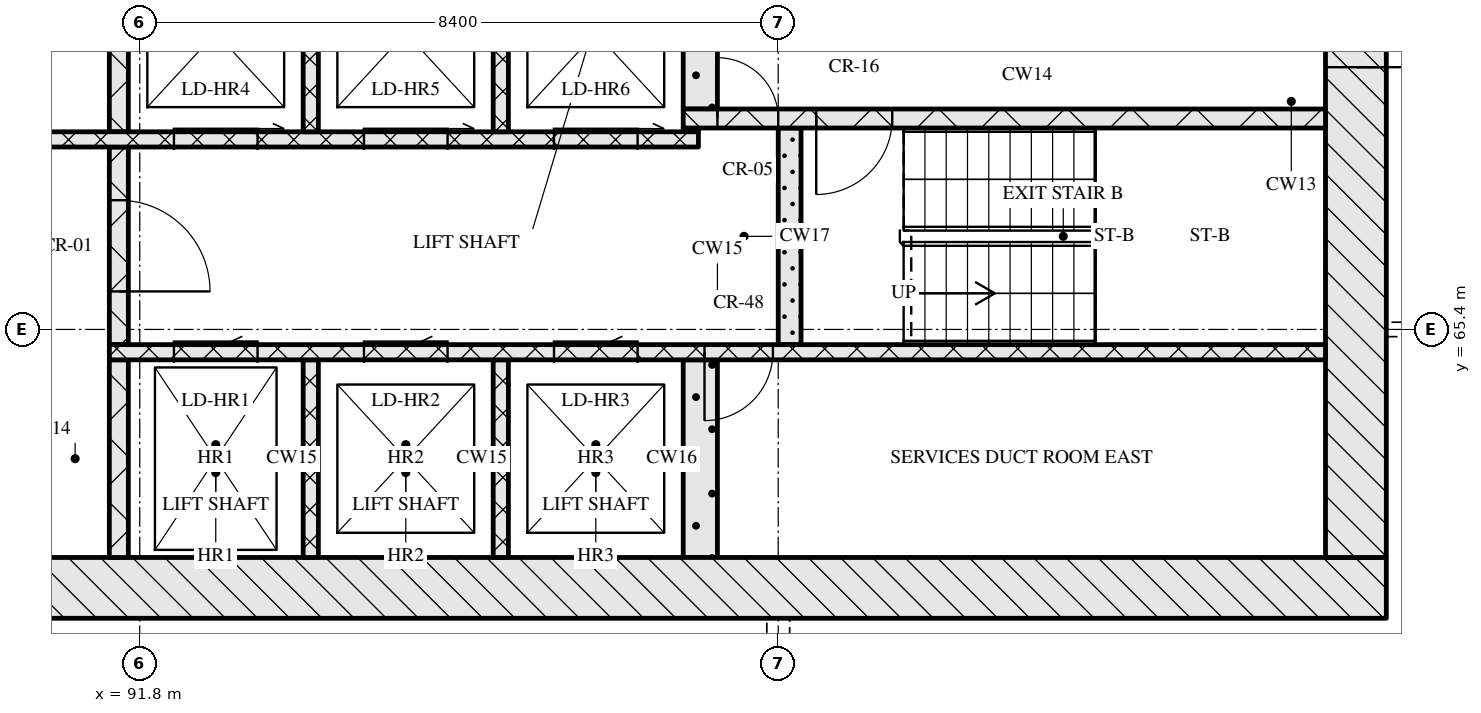
"""IFC4 building model, lengths in metres.
Left out: names, types, materials, properties, quantities, classifications, styles, units other than length and angle.
Written with IfcOpenShell. Run it as: python <this file> out.ifc"""

import sys

from ifc_helpers import new_model, si_unit, direction, frame, frame_2d, origin, place, context, subcontext, project, spatial, rectangle, extrude, element, fill, save


model = new_model("IFC4")
c1 = context("Model", 3, precision=1e-05, world=origin(), true_north=direction((0.0, 1.0)))
c2 = subcontext(c1, "Body", "Model", "MODEL_VIEW")
j1 = project(units=[si_unit("LENGTHUNIT", "METRE"), si_unit("PLANEANGLEUNIT", "RADIAN")], contexts=[c1])
p1 = place(None, origin())
s1 = spatial("IfcSite", under=j1, at=p1, CompositionType="ELEMENT")
p2 = place(p1, origin())
s2 = spatial("IfcBuilding", under=s1, at=p2, CompositionType="ELEMENT")
p3 = place(p2, frame((0.0, 0.0, 190.65)))
s3 = spatial("IfcBuildingStorey", under=s2, at=p3, CompositionType="ELEMENT", Elevation=190.65)
p4 = place(p3, frame((67.0, 62.0, 0.0), z_axis=(0.0, 0.0, 1.0), x_axis=(1.0, 0.0, 0.0)))
e1 = element("IfcWall", 1, at=p4, inside=s3, PredefinedType="SOLIDWALL", context=c2, shape_type="SweptSolid", body=[
    extrude(rectangle(XDim=41.2, YDim=0.8, at=frame_2d((20.6, 0.0))), origin(), (0.0, 0.0, 1.0), 3.3),
])
p5 = place(p4, frame((20.95, 0.0, 0.0)))
e2 = element("IfcOpeningElement", 2, at=p5, cuts=e1, PredefinedType="OPENING", context=c2, shape_type="SweptSolid", body=[
    extrude(rectangle(XDim=1.8, YDim=2.1, at=frame_2d((0.9, 1.05))), frame((0.0, 0.41, 0.0), z_axis=(0.0, -1.0, 0.0), x_axis=(1.0, 0.0, 0.0)), (0.0, 0.0, 1.0), 0.82),
])
p6 = place(p3, frame((107.8, 62.4, 0.0), z_axis=(0.0, 0.0, 1.0), x_axis=(0.0, 1.0, 0.0)))
e3 = element("IfcWall", 3, at=p6, inside=s3, PredefinedType="SOLIDWALL", context=c2, shape_type="SweptSolid", body=[
    extrude(rectangle(XDim=12.0, YDim=0.8, at=frame_2d((6.0, 0.0))), origin(), (0.0, 0.0, 1.0), 3.3),
])
p7 = place(p6, frame((6.45, 0.0, 0.0)))
e4 = element("IfcOpeningElement", 4, at=p7, cuts=e3, PredefinedType="OPENING", context=c2, shape_type="SweptSolid", body=[
    extrude(rectangle(XDim=1.2, YDim=2.1, at=frame_2d((0.6, 1.05))), frame((0.0, 0.41, 0.0), z_axis=(0.0, -1.0, 0.0), x_axis=(1.0, 0.0, 0.0)), (0.0, 0.0, 1.0), 0.82),
])
p8 = place(p3, frame((91.525, 62.4, 0.0), z_axis=(0.0, 0.0, 1.0), x_axis=(0.0, 1.0, 0.0)))
e5 = element("IfcWall", 5, at=p8, inside=s3, PredefinedType="SOLIDWALL", context=c2, shape_type="SweptSolid", body=[
    extrude(rectangle(XDim=2.6, YDim=0.25, at=frame_2d((1.3, 0.0))), origin(), (0.0, 0.0, 1.0), 3.3),
])
for number, where, z_axis, x_axis in (
    (6, (94.05, 62.4, 0.0), (0.0, 0.0, 1.0), (0.0, 1.0, 0.0)),
    (7, (96.55, 62.4, 0.0), (0.0, 0.0, 1.0), (0.0, 1.0, 0.0)),
):
    element("IfcWall", number, at=place(p3, frame(where, z_axis=z_axis, x_axis=x_axis)), inside=s3, PredefinedType="SOLIDWALL", context=c2, shape_type="SweptSolid", body=[
        extrude(rectangle(XDim=2.6, YDim=0.2, at=frame_2d((1.3, 0.0))), origin(), (0.0, 0.0, 1.0), 3.3),
    ])
p9 = place(p3, frame((99.175, 62.4, 0.0), z_axis=(0.0, 0.0, 1.0), x_axis=(0.0, 1.0, 0.0)))
e8 = element("IfcWall", 8, at=p9, inside=s3, PredefinedType="SOLIDWALL", context=c2, shape_type="SweptSolid", body=[
    extrude(rectangle(XDim=2.6, YDim=0.45, at=frame_2d((1.3, 0.0))), origin(), (0.0, 0.0, 1.0), 3.3),
])
p10 = place(p3, frame((91.4, 65.1, 0.0), z_axis=(0.0, 0.0, 1.0), x_axis=(1.0, 0.0, 0.0)))
e9 = element("IfcWall", 9, at=p10, inside=s3, PredefinedType="SOLIDWALL", context=c2, shape_type="SweptSolid", body=[
    extrude(rectangle(XDim=16.0, YDim=0.2, at=frame_2d((8.0, 0.0))), origin(), (0.0, 0.0, 1.0), 3.3),
])
p11 = place(p10, frame((0.85, 0.0, 0.0)))
e10 = element("IfcOpeningElement", 10, at=p11, cuts=e9, PredefinedType="OPENING", context=c2, shape_type="SweptSolid", body=[
    extrude(rectangle(XDim=1.1, YDim=2.1, at=frame_2d((0.55, 1.05))), frame((0.0, 0.11, 0.0), z_axis=(0.0, -1.0, 0.0), x_axis=(1.0, 0.0, 0.0)), (0.0, 0.0, 1.0), 0.22),
])
p12 = place(p10, frame((3.35, 0.0, 0.0)))
e11 = element("IfcOpeningElement", 11, at=p12, cuts=e9, PredefinedType="OPENING", context=c2, shape_type="SweptSolid", body=[
    extrude(rectangle(XDim=1.1, YDim=2.1, at=frame_2d((0.55, 1.05))), frame((0.0, 0.11, 0.0), z_axis=(0.0, -1.0, 0.0), x_axis=(1.0, 0.0, 0.0)), (0.0, 0.0, 1.0), 0.22),
])
p13 = place(p10, frame((5.85, 0.0, 0.0)))
e12 = element("IfcOpeningElement", 12, at=p13, cuts=e9, PredefinedType="OPENING", context=c2, shape_type="SweptSolid", body=[
    extrude(rectangle(XDim=1.1, YDim=2.1, at=frame_2d((0.55, 1.05))), frame((0.0, 0.11, 0.0), z_axis=(0.0, -1.0, 0.0), x_axis=(1.0, 0.0, 0.0)), (0.0, 0.0, 1.0), 0.22),
])
p14 = place(p10, frame((7.83, 0.0, 0.0)))
e13 = element("IfcOpeningElement", 13, at=p14, cuts=e9, PredefinedType="OPENING", context=c2, shape_type="SweptSolid", body=[
    extrude(rectangle(XDim=0.9, YDim=2.1, at=frame_2d((0.45, 1.05))), frame((0.0, 0.11, 0.0), z_axis=(0.0, -1.0, 0.0), x_axis=(1.0, 0.0, 0.0)), (0.0, 0.0, 1.0), 0.22),
])
p15 = place(p3, frame((91.525, 65.2, 0.0), z_axis=(0.0, 0.0, 1.0), x_axis=(0.0, 1.0, 0.0)))
e14 = element("IfcWall", 14, at=p15, inside=s3, PredefinedType="SOLIDWALL", context=c2, shape_type="SweptSolid", body=[
    extrude(rectangle(XDim=2.6, YDim=0.25, at=frame_2d((1.3, 0.0))), origin(), (0.0, 0.0, 1.0), 3.3),
])
p16 = place(p15, frame((0.7, 0.0, 0.0)))
e15 = element("IfcOpeningElement", 15, at=p16, cuts=e14, PredefinedType="OPENING", context=c2, shape_type="SweptSolid", body=[
    extrude(rectangle(XDim=1.2, YDim=2.1, at=frame_2d((0.6, 1.05))), frame((0.0, 0.135, 0.0), z_axis=(0.0, -1.0, 0.0), x_axis=(1.0, 0.0, 0.0)), (0.0, 0.0, 1.0), 0.27),
])
p17 = place(p3, frame((100.35, 65.2, 0.0), z_axis=(0.0, 0.0, 1.0), x_axis=(0.0, 1.0, 0.0)))
e16 = element("IfcWall", 16, at=p17, inside=s3, PredefinedType="SOLIDWALL", context=c2, shape_type="SweptSolid", body=[
    extrude(rectangle(XDim=2.85, YDim=0.3, at=frame_2d((1.425, 0.0))), origin(), (0.0, 0.0, 1.0), 3.3),
])
p18 = place(p3, frame((76.05, 67.9, 0.0), z_axis=(0.0, 0.0, 1.0), x_axis=(1.0, 0.0, 0.0)))
e17 = element("IfcWall", 17, at=p18, inside=s3, PredefinedType="SOLIDWALL", context=c2, shape_type="SweptSolid", body=[
    extrude(rectangle(XDim=23.1, YDim=0.2, at=frame_2d((11.55, 0.0))), origin(), (0.0, 0.0, 1.0), 3.3),
])
p19 = place(p18, frame((1.95, 0.0, 0.0)))
e18 = element("IfcOpeningElement", 18, at=p19, cuts=e17, PredefinedType="OPENING", context=c2, shape_type="SweptSolid", body=[
    extrude(rectangle(XDim=0.9, YDim=2.1, at=frame_2d((0.45, 1.05))), frame((0.0, 0.11, 0.0), z_axis=(0.0, -1.0, 0.0), x_axis=(1.0, 0.0, 0.0)), (0.0, 0.0, 1.0), 0.22),
])
p20 = place(p18, frame((5.66, 0.0, 0.0)))
e19 = element("IfcOpeningElement", 19, at=p20, cuts=e17, PredefinedType="OPENING", context=c2, shape_type="SweptSolid", body=[
    extrude(rectangle(XDim=0.9, YDim=2.1, at=frame_2d((0.45, 1.05))), frame((0.0, 0.11, 0.0), z_axis=(0.0, -1.0, 0.0), x_axis=(1.0, 0.0, 0.0)), (0.0, 0.0, 1.0), 0.22),
])
p21 = place(p18, frame((9.7, 0.0, 0.0)))
e20 = element("IfcOpeningElement", 20, at=p21, cuts=e17, PredefinedType="OPENING", context=c2, shape_type="SweptSolid", body=[
    extrude(rectangle(XDim=0.9, YDim=2.1, at=frame_2d((0.45, 1.05))), frame((0.0, 0.11, 0.0), z_axis=(0.0, -1.0, 0.0), x_axis=(1.0, 0.0, 0.0)), (0.0, 0.0, 1.0), 0.22),
])
p22 = place(p18, frame((13.55, 0.0, 0.0)))
e21 = element("IfcOpeningElement", 21, at=p22, cuts=e17, PredefinedType="OPENING", context=c2, shape_type="SweptSolid", body=[
    extrude(rectangle(XDim=1.0, YDim=2.1, at=frame_2d((0.5, 1.05))), frame((0.0, 0.11, 0.0), z_axis=(0.0, -1.0, 0.0), x_axis=(1.0, 0.0, 0.0)), (0.0, 0.0, 1.0), 0.22),
])
p23 = place(p18, frame((16.2, 0.0, 0.0)))
e22 = element("IfcOpeningElement", 22, at=p23, cuts=e17, PredefinedType="OPENING", context=c2, shape_type="SweptSolid", body=[
    extrude(rectangle(XDim=1.1, YDim=2.1, at=frame_2d((0.55, 1.05))), frame((0.0, 0.11, 0.0), z_axis=(0.0, -1.0, 0.0), x_axis=(1.0, 0.0, 0.0)), (0.0, 0.0, 1.0), 0.22),
])
p24 = place(p18, frame((18.7, 0.0, 0.0)))
e23 = element("IfcOpeningElement", 23, at=p24, cuts=e17, PredefinedType="OPENING", context=c2, shape_type="SweptSolid", body=[
    extrude(rectangle(XDim=1.1, YDim=2.1, at=frame_2d((0.55, 1.05))), frame((0.0, 0.11, 0.0), z_axis=(0.0, -1.0, 0.0), x_axis=(1.0, 0.0, 0.0)), (0.0, 0.0, 1.0), 0.22),
])
p25 = place(p18, frame((21.2, 0.0, 0.0)))
e24 = element("IfcOpeningElement", 24, at=p25, cuts=e17, PredefinedType="OPENING", context=c2, shape_type="SweptSolid", body=[
    extrude(rectangle(XDim=1.1, YDim=2.1, at=frame_2d((0.55, 1.05))), frame((0.0, 0.11, 0.0), z_axis=(0.0, -1.0, 0.0), x_axis=(1.0, 0.0, 0.0)), (0.0, 0.0, 1.0), 0.22),
])
p26 = place(p3, frame((91.525, 68.0, 0.0), z_axis=(0.0, 0.0, 1.0), x_axis=(0.0, 1.0, 0.0)))
e25 = element("IfcWall", 25, at=p26, inside=s3, PredefinedType="SOLIDWALL", context=c2, shape_type="SweptSolid", body=[
    extrude(rectangle(XDim=2.6, YDim=0.25, at=frame_2d((1.3, 0.0))), origin(), (0.0, 0.0, 1.0), 3.3),
])
for number, where, z_axis, x_axis in (
    (26, (94.05, 68.0, 0.0), (0.0, 0.0, 1.0), (0.0, 1.0, 0.0)),
    (27, (96.55, 68.0, 0.0), (0.0, 0.0, 1.0), (0.0, 1.0, 0.0)),
):
    element("IfcWall", number, at=place(p3, frame(where, z_axis=z_axis, x_axis=x_axis)), inside=s3, PredefinedType="SOLIDWALL", context=c2, shape_type="SweptSolid", body=[
        extrude(rectangle(XDim=2.6, YDim=0.2, at=frame_2d((1.3, 0.0))), origin(), (0.0, 0.0, 1.0), 3.3),
    ])
p27 = place(p3, frame((98.95, 68.025, 0.0), z_axis=(0.0, 0.0, 1.0), x_axis=(1.0, 0.0, 0.0)))
e28 = element("IfcWall", 28, at=p27, inside=s3, PredefinedType="SOLIDWALL", context=c2, shape_type="SweptSolid", body=[
    extrude(rectangle(XDim=0.2, YDim=0.05, at=frame_2d((0.1, 0.0))), origin(), (0.0, 0.0, 1.0), 3.3),
])
p28 = place(p3, frame((98.95, 68.175, 0.0), z_axis=(0.0, 0.0, 1.0), x_axis=(1.0, 0.0, 0.0)))
e29 = element("IfcWall", 29, at=p28, inside=s3, PredefinedType="SOLIDWALL", context=c2, shape_type="SweptSolid", body=[
    extrude(rectangle(XDim=8.45, YDim=0.25, at=frame_2d((4.225, 0.0))), origin(), (0.0, 0.0, 1.0), 3.3),
])
p29 = place(p28, frame((0.45, 0.0, 0.0)))
e30 = element("IfcOpeningElement", 30, at=p29, cuts=e29, PredefinedType="OPENING", context=c2, shape_type="SweptSolid", body=[
    extrude(rectangle(XDim=0.8, YDim=2.1, at=frame_2d((0.4, 1.05))), frame((0.0, 0.135, 0.0), z_axis=(0.0, -1.0, 0.0), x_axis=(1.0, 0.0, 0.0)), (0.0, 0.0, 1.0), 0.27),
])
p30 = place(p28, frame((1.75, 0.0, 0.0)))
e31 = element("IfcOpeningElement", 31, at=p30, cuts=e29, PredefinedType="OPENING", context=c2, shape_type="SweptSolid", body=[
    extrude(rectangle(XDim=1.0, YDim=2.1, at=frame_2d((0.5, 1.05))), frame((0.0, 0.135, 0.0), z_axis=(0.0, -1.0, 0.0), x_axis=(1.0, 0.0, 0.0)), (0.0, 0.0, 1.0), 0.27),
])
p31 = place(p3, frame((99.175, 68.3, 0.0), z_axis=(0.0, 0.0, 1.0), x_axis=(0.0, 1.0, 0.0)))
e32 = element("IfcWall", 32, at=p31, inside=s3, PredefinedType="SOLIDWALL", context=c2, shape_type="SweptSolid", body=[
    extrude(rectangle(XDim=2.3, YDim=0.45, at=frame_2d((1.15, 0.0))), origin(), (0.0, 0.0, 1.0), 3.3),
])
p32 = place(p11, origin())
e33 = element("IfcDoor", 33, at=p32, inside=s3, OperationType="SLIDING_TO_LEFT", PredefinedType="DOOR", context=c2, shape_type="SweptSolid", body=[
    extrude(rectangle(XDim=1.1, YDim=2.1, at=frame_2d((0.55, 1.05))), frame((0.0, 0.025, 0.0), z_axis=(0.0, -1.0, 0.0), x_axis=(1.0, 0.0, 0.0)), (0.0, 0.0, 1.0), 0.05),
])
fill(e10, e33)
p33 = place(p12, origin())
e34 = element("IfcDoor", 34, at=p33, inside=s3, OperationType="SLIDING_TO_LEFT", PredefinedType="DOOR", context=c2, shape_type="SweptSolid", body=[
    extrude(rectangle(XDim=1.1, YDim=2.1, at=frame_2d((0.55, 1.05))), frame((0.0, 0.025, 0.0), z_axis=(0.0, -1.0, 0.0), x_axis=(1.0, 0.0, 0.0)), (0.0, 0.0, 1.0), 0.05),
])
fill(e11, e34)
p34 = place(p13, origin())
e35 = element("IfcDoor", 35, at=p34, inside=s3, OperationType="SLIDING_TO_LEFT", PredefinedType="DOOR", context=c2, shape_type="SweptSolid", body=[
    extrude(rectangle(XDim=1.1, YDim=2.1, at=frame_2d((0.55, 1.05))), frame((0.0, 0.025, 0.0), z_axis=(0.0, -1.0, 0.0), x_axis=(1.0, 0.0, 0.0)), (0.0, 0.0, 1.0), 0.05),
])
fill(e12, e35)
p35 = place(p14, origin())
e36 = element("IfcDoor", 36, at=p35, inside=s3, OperationType="SINGLE_SWING_RIGHT", PredefinedType="DOOR", context=c2, shape_type="SweptSolid", body=[
    extrude(rectangle(XDim=0.9, YDim=2.1, at=frame_2d((0.45, 1.05))), frame((0.0, 0.025, 0.0), z_axis=(0.0, -1.0, 0.0), x_axis=(1.0, 0.0, 0.0)), (0.0, 0.0, 1.0), 0.05),
])
fill(e13, e36)
p36 = place(p16, origin())
e37 = element("IfcDoor", 37, at=p36, inside=s3, OperationType="SINGLE_SWING_RIGHT", PredefinedType="DOOR", context=c2, shape_type="SweptSolid", body=[
    extrude(rectangle(XDim=1.2, YDim=2.1, at=frame_2d((0.6, 1.05))), frame((0.0, 0.025, 0.0), z_axis=(0.0, -1.0, 0.0), x_axis=(1.0, 0.0, 0.0)), (0.0, 0.0, 1.0), 0.05),
])
fill(e15, e37)
p37 = place(p23, origin())
e38 = element("IfcDoor", 38, at=p37, inside=s3, OperationType="SLIDING_TO_RIGHT", PredefinedType="DOOR", context=c2, shape_type="SweptSolid", body=[
    extrude(rectangle(XDim=1.1, YDim=2.1, at=frame_2d((0.55, 1.05))), frame((0.0, 0.025, 0.0), z_axis=(0.0, -1.0, 0.0), x_axis=(1.0, 0.0, 0.0)), (0.0, 0.0, 1.0), 0.05),
])
fill(e22, e38)
p38 = place(p24, origin())
e39 = element("IfcDoor", 39, at=p38, inside=s3, OperationType="SLIDING_TO_RIGHT", PredefinedType="DOOR", context=c2, shape_type="SweptSolid", body=[
    extrude(rectangle(XDim=1.1, YDim=2.1, at=frame_2d((0.55, 1.05))), frame((0.0, 0.025, 0.0), z_axis=(0.0, -1.0, 0.0), x_axis=(1.0, 0.0, 0.0)), (0.0, 0.0, 1.0), 0.05),
])
fill(e23, e39)
p39 = place(p25, origin())
e40 = element("IfcDoor", 40, at=p39, inside=s3, OperationType="SLIDING_TO_RIGHT", PredefinedType="DOOR", context=c2, shape_type="SweptSolid", body=[
    extrude(rectangle(XDim=1.1, YDim=2.1, at=frame_2d((0.55, 1.05))), frame((0.0, 0.025, 0.0), z_axis=(0.0, -1.0, 0.0), x_axis=(1.0, 0.0, 0.0)), (0.0, 0.0, 1.0), 0.05),
])
fill(e24, e40)
p40 = place(p29, origin())
e41 = element("IfcDoor", 41, at=p40, inside=s3, OperationType="SINGLE_SWING_LEFT", PredefinedType="DOOR", context=c2, shape_type="SweptSolid", body=[
    extrude(rectangle(XDim=0.8, YDim=2.1, at=frame_2d((0.4, 1.05))), frame((0.0, 0.025, 0.0), z_axis=(0.0, -1.0, 0.0), x_axis=(1.0, 0.0, 0.0)), (0.0, 0.0, 1.0), 0.05),
])
fill(e30, e41)
p41 = place(p30, origin())
e42 = element("IfcDoor", 42, at=p41, inside=s3, OperationType="SINGLE_SWING_RIGHT", PredefinedType="DOOR", context=c2, shape_type="SweptSolid", body=[
    extrude(rectangle(XDim=1.0, YDim=2.1, at=frame_2d((0.5, 1.05))), frame((0.0, 0.025, 0.0), z_axis=(0.0, -1.0, 0.0), x_axis=(1.0, 0.0, 0.0)), (0.0, 0.0, 1.0), 0.05),
])
fill(e31, e42)
p42 = place(p7, origin())
e43 = element("IfcDoor", 43, at=p42, inside=s3, OperationType="SINGLE_SWING_RIGHT", PredefinedType="DOOR", context=c2, shape_type="SweptSolid", body=[
    extrude(rectangle(XDim=1.2, YDim=2.1, at=frame_2d((0.6, 1.05))), frame((0.0, 0.025, 0.0), z_axis=(0.0, -1.0, 0.0), x_axis=(1.0, 0.0, 0.0)), (0.0, 0.0, 1.0), 0.05),
])
fill(e4, e43)
save(model, sys.argv[1])
